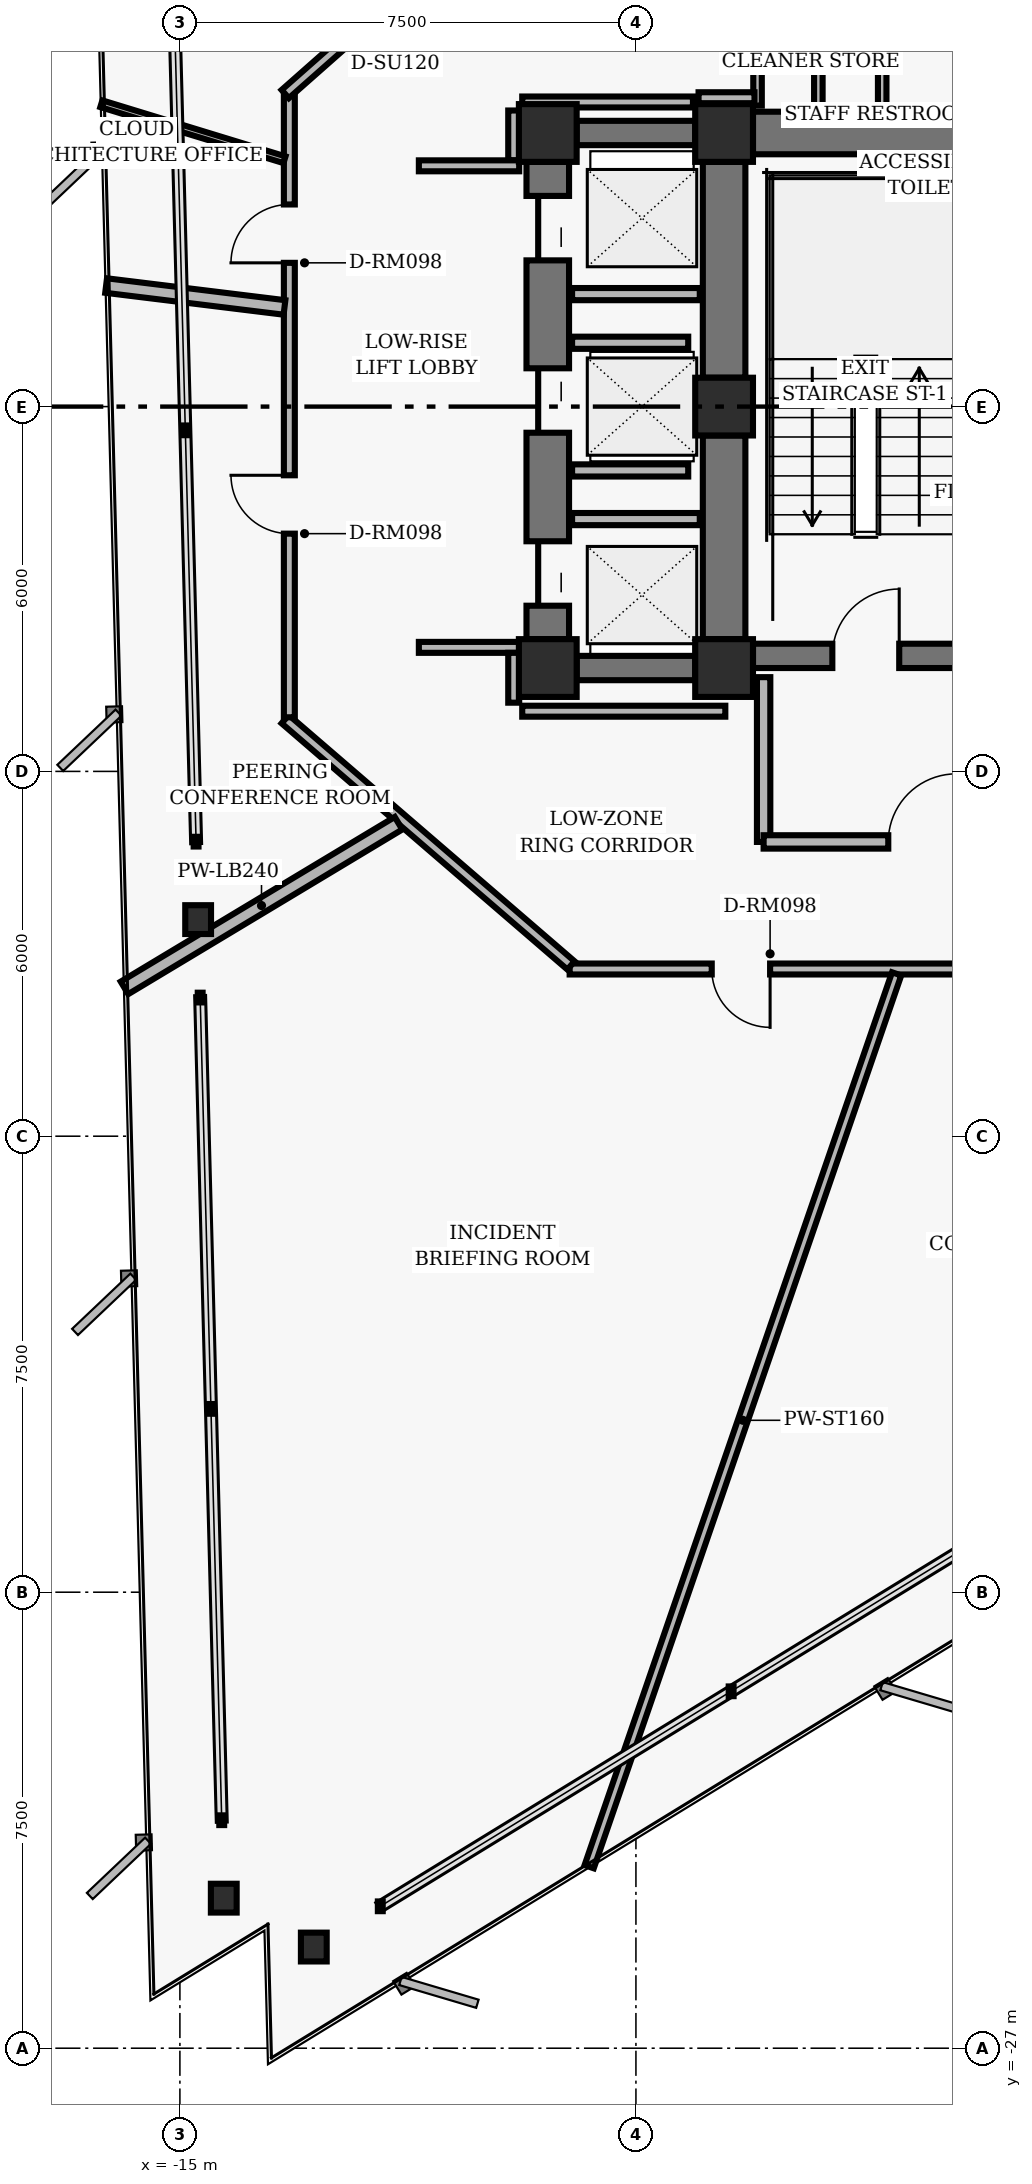
"""IFC4 building model, lengths in metres.
Left out: names, types, materials, properties, quantities, classifications, styles, units other than length and angle.
Written with IfcOpenShell. Run it as: python <this file> out.ifc"""

import sys

from ifc_helpers import new_model, si_unit, direction, frame, frame_2d, origin, origin_2d, place, context, subcontext, project, spatial, rectangle, hollow_rectangle, i_section, extrude, element, fill, save


model = new_model("IFC4")
c1 = context("Model", 3, precision=1e-05, world=origin(), true_north=direction((0.0, 1.0)))
c2 = subcontext(c1, "Body", "Model", "MODEL_VIEW")
j1 = project(units=[si_unit("LENGTHUNIT", "METRE"), si_unit("PLANEANGLEUNIT", "RADIAN")], contexts=[c1])
p1 = place(None, origin())
s1 = spatial("IfcSite", under=j1, at=p1, CompositionType="ELEMENT")
p2 = place(p1, origin())
s2 = spatial("IfcBuilding", under=s1, at=p2, CompositionType="ELEMENT")
p3 = place(p2, frame((0.0, 0.0, 32.32)))
s3 = spatial("IfcBuildingStorey", under=s2, at=p3, CompositionType="ELEMENT", Elevation=32.32)
for number, where, z_axis, x_axis in (
    (1, (-6.05, 4.5, 0.0), (0.0, 0.0, 1.0), (1.0, 0.0, 0.0)),
    (2, (-6.05, 0.0, 0.0), (0.0, 0.0, 1.0), (1.0, 0.0, 0.0)),
    (3, (-6.05, -4.3, 0.0), (0.0, 0.0, 1.0), (1.0, 0.0, 0.0)),
    (4, (-8.95, 4.5, 0.0), (0.0, 0.0, 1.0), (1.0, 0.0, 0.0)),
    (5, (-8.95, -4.3, 0.0), (0.0, 0.0, 1.0), (1.0, 0.0, 0.0)),
):
    element("IfcColumn", number, at=place(p3, frame(where, z_axis=z_axis, x_axis=x_axis)), inside=s3, PredefinedType="COLUMN", context=c2, shape_type="SweptSolid", body=[
        extrude(hollow_rectangle(XDim=0.95, YDim=0.95, WallThickness=0.06, InnerFilletRadius=0.02, OuterFilletRadius=0.04, at=origin_2d()), origin(), (0.0, 0.0, 1.0), 3.36),
    ])
p4 = place(p3, frame((-6.05, 0.475, 0.0), z_axis=(0.0, 0.0, 1.0), x_axis=(0.0, 1.0, 0.0)))
e6 = element("IfcWall", 6, at=p4, inside=s3, PredefinedType="SHEAR", context=c2, shape_type="SweptSolid", body=[
    extrude(rectangle(XDim=3.55, YDim=0.7, at=frame_2d((1.775, 0.0))), origin(), (0.0, 0.0, 1.0), 3.098),
])
p5 = place(p3, frame((-6.05, -3.825, 0.0), z_axis=(0.0, 0.0, 1.0), x_axis=(0.0, 1.0, 0.0)))
e7 = element("IfcWall", 7, at=p5, inside=s3, PredefinedType="SHEAR", context=c2, shape_type="SweptSolid", body=[
    extrude(rectangle(XDim=3.35, YDim=0.7, at=frame_2d((1.675, 0.0))), origin(), (0.0, 0.0, 1.0), 3.098),
])
p6 = place(p3, frame((-5.575, -4.1, 0.0), z_axis=(0.0, 0.0, 1.0), x_axis=(1.0, 0.0, 0.0)))
e8 = element("IfcWall", 8, at=p6, inside=s3, PredefinedType="SHEAR", context=c2, shape_type="SweptSolid", body=[
    extrude(rectangle(XDim=11.15, YDim=0.4, at=frame_2d((5.575, 0.0))), origin(), (0.0, 0.0, 1.0), 3.098),
])
p7 = place(p6, frame((1.305, 0.0, 0.0)))
e9 = element("IfcOpeningElement", 9, at=p7, cuts=e8, PredefinedType="OPENING", context=c2, shape_type="SweptSolid", body=[
    extrude(rectangle(XDim=1.1, YDim=2.04, at=frame_2d((0.55, 1.02))), frame((0.0, 0.21, 0.0), z_axis=(0.0, -1.0, 0.0), x_axis=(1.0, 0.0, 0.0)), (0.0, 0.0, 1.0), 0.42),
])
p8 = place(p6, frame((8.745, 0.0, 0.0)))
e10 = element("IfcOpeningElement", 10, at=p8, cuts=e8, PredefinedType="OPENING", context=c2, shape_type="SweptSolid", body=[
    extrude(rectangle(XDim=1.1, YDim=2.04, at=frame_2d((0.55, 1.02))), frame((0.0, 0.21, 0.0), z_axis=(0.0, -1.0, 0.0), x_axis=(1.0, 0.0, 0.0)), (0.0, 0.0, 1.0), 0.42),
])
p9 = place(p6, frame((4.045, 0.0, 0.0)))
e11 = element("IfcOpeningElement", 11, at=p9, cuts=e8, PredefinedType="OPENING", context=c2, shape_type="SweptSolid", body=[
    extrude(rectangle(XDim=1.06, YDim=2.04, at=frame_2d((0.53, 1.02))), frame((0.0, 0.21, 0.0), z_axis=(0.0, -1.0, 0.0), x_axis=(1.0, 0.0, 0.0)), (0.0, 0.0, 1.0), 0.42),
])
p10 = place(p6, frame((6.045, 0.0, 0.0)))
e12 = element("IfcOpeningElement", 12, at=p10, cuts=e8, PredefinedType="OPENING", context=c2, shape_type="SweptSolid", body=[
    extrude(rectangle(XDim=1.06, YDim=2.04, at=frame_2d((0.53, 1.02))), frame((0.0, 0.21, 0.0), z_axis=(0.0, -1.0, 0.0), x_axis=(1.0, 0.0, 0.0)), (0.0, 0.0, 1.0), 0.42),
])
p11 = place(p3, frame((-5.575, 4.5, 0.0), z_axis=(0.0, 0.0, 1.0), x_axis=(1.0, 0.0, 0.0)))
e13 = element("IfcWall", 13, at=p11, inside=s3, PredefinedType="SHEAR", context=c2, shape_type="SweptSolid", body=[
    extrude(rectangle(XDim=3.525, YDim=0.7, at=frame_2d((1.762, 0.0))), origin(), (0.0, 0.0, 1.0), 3.098),
])
p12 = place(p3, frame((-8.95, -3.825, 0.0), z_axis=(0.0, 0.0, 1.0), x_axis=(0.0, 1.0, 0.0)))
e14 = element("IfcWall", 14, at=p12, inside=s3, PredefinedType="SHEAR", context=c2, shape_type="SweptSolid", body=[
    extrude(rectangle(XDim=7.85, YDim=0.7, at=frame_2d((3.925, 0.0))), origin(), (0.0, 0.0, 1.0), 3.098),
])
p13 = place(p12, frame((0.55, 0.0, 0.0)))
e15 = element("IfcOpeningElement", 15, at=p13, cuts=e14, PredefinedType="OPENING", context=c2, shape_type="SweptSolid", body=[
    extrude(rectangle(XDim=1.06, YDim=2.04, at=frame_2d((0.53, 1.02))), frame((0.0, 0.36, 0.0), z_axis=(0.0, -1.0, 0.0), x_axis=(1.0, 0.0, 0.0)), (0.0, 0.0, 1.0), 0.72),
])
p14 = place(p12, frame((3.395, 0.0, 0.0)))
e16 = element("IfcOpeningElement", 16, at=p14, cuts=e14, PredefinedType="OPENING", context=c2, shape_type="SweptSolid", body=[
    extrude(rectangle(XDim=1.06, YDim=2.04, at=frame_2d((0.53, 1.02))), frame((0.0, 0.36, 0.0), z_axis=(0.0, -1.0, 0.0), x_axis=(1.0, 0.0, 0.0)), (0.0, 0.0, 1.0), 0.72),
])
p15 = place(p12, frame((6.23, 0.0, 0.0)))
e17 = element("IfcOpeningElement", 17, at=p15, cuts=e14, PredefinedType="OPENING", context=c2, shape_type="SweptSolid", body=[
    extrude(rectangle(XDim=1.06, YDim=2.04, at=frame_2d((0.53, 1.02))), frame((0.0, 0.36, 0.0), z_axis=(0.0, -1.0, 0.0), x_axis=(1.0, 0.0, 0.0)), (0.0, 0.0, 1.0), 0.72),
])
for number, where, z_axis, x_axis in (
    (18, (-8.475, 4.5, 0.0), (0.0, 0.0, 1.0), (1.0, 0.0, 0.0)),
    (19, (-8.475, -4.3, 0.0), (0.0, 0.0, 1.0), (1.0, 0.0, 0.0)),
):
    element("IfcWall", number, at=place(p3, frame(where, z_axis=z_axis, x_axis=x_axis)), inside=s3, PredefinedType="SHEAR", context=c2, shape_type="SweptSolid", body=[
        extrude(rectangle(XDim=1.95, YDim=0.4, at=frame_2d((0.975, 0.0))), origin(), (0.0, 0.0, 1.0), 3.098),
    ])
for number, where, z_axis, x_axis in (
    (20, (-14.7, -8.438, 0.0), (0.0, 0.0, 1.0), (1.0, 0.0, 0.0)),
    (21, (-14.279, -24.532, 0.0), (0.0, 0.0, 1.0), (1.0, 0.0, 0.0)),
    (22, (-12.798, -25.336, 0.0), (0.0, 0.0, 1.0), (1.0, 0.0, 0.0)),
):
    element("IfcColumn", number, at=place(p3, frame(where, z_axis=z_axis, x_axis=x_axis)), inside=s3, PredefinedType="COLUMN", context=c2, shape_type="SweptSolid", body=[
        extrude(i_section(OverallWidth=0.424, OverallDepth=0.474, WebThickness=0.048, FlangeThickness=0.077, FilletRadius=0.025, at=origin_2d()), origin(), (0.0, 0.0, 1.0), 3.36),
    ])
p16 = place(p3, frame((-5.4, -7.16, 0.0), z_axis=(0.0, 0.0, 1.0), x_axis=(0.0, 1.0, 0.0)))
e23 = element("IfcWall", 23, at=p16, inside=s3, PredefinedType="PARTITIONING", context=c2, shape_type="SweptSolid", body=[
    extrude(rectangle(XDim=2.71, YDim=0.22, at=frame_2d((1.355, 0.0))), origin(), (0.0, 0.0, 1.0), 3.073),
])
p17 = place(p3, frame((-5.4, -7.16, 0.0), z_axis=(0.0, 0.0, 1.0), x_axis=(1.0, 0.0, 0.0)))
e24 = element("IfcWall", 24, at=p17, inside=s3, PredefinedType="PARTITIONING", context=c2, shape_type="SweptSolid", body=[
    extrude(rectangle(XDim=5.4, YDim=0.22, at=frame_2d((2.7, 0.0))), origin(), (0.0, 0.0, 1.0), 3.073),
])
p18 = place(p17, frame((2.05, 0.0, 0.0)))
e25 = element("IfcOpeningElement", 25, at=p18, cuts=e24, PredefinedType="OPENING", context=c2, shape_type="SweptSolid", body=[
    extrude(rectangle(XDim=1.12, YDim=2.02, at=frame_2d((0.56, 1.01))), frame((0.0, 0.12, 0.0), z_axis=(0.0, -1.0, 0.0), x_axis=(1.0, 0.0, 0.0)), (0.0, 0.0, 1.0), 0.24),
])
for number, where, z_axis, x_axis in (
    (26, (-5.5, 4.95, 0.0), (0.0, 0.0, 1.0), (0.0, 1.0, 0.0)),
    (27, (-4.5, 4.95, 0.0), (0.0, 0.0, 1.0), (0.0, 1.0, 0.0)),
    (28, (-3.45, 4.95, 0.0), (0.0, 0.0, 1.0), (0.0, 1.0, 0.0)),
):
    element("IfcWall", number, at=place(p3, frame(where, z_axis=z_axis, x_axis=x_axis)), inside=s3, PredefinedType="PARTITIONING", context=c2, shape_type="SweptSolid", body=[
        extrude(rectangle(XDim=2.1, YDim=0.14, at=frame_2d((1.05, 0.0))), origin(), (0.0, 0.0, 1.0), 3.073),
    ])
for number, where, z_axis, x_axis in (
    (29, (-8.55, -1.85, 0.0), (0.0, 0.0, 1.0), (1.0, 0.0, 0.0)),
    (30, (-8.55, 1.85, 0.0), (0.0, 0.0, 1.0), (1.0, 0.0, 0.0)),
):
    element("IfcWall", number, at=place(p3, frame(where, z_axis=z_axis, x_axis=x_axis)), inside=s3, PredefinedType="PARTITIONING", context=c2, shape_type="SweptSolid", body=[
        extrude(rectangle(XDim=2.1, YDim=0.2, at=frame_2d((1.05, 0.0))), origin(), (0.0, 0.0, 1.0), 3.073),
    ])
for number, where, z_axis, x_axis in (
    (31, (-8.55, -1.05, 0.0), (0.0, 0.0, 1.0), (1.0, 0.0, 0.0)),
    (32, (-8.55, 1.05, 0.0), (0.0, 0.0, 1.0), (1.0, 0.0, 0.0)),
):
    element("IfcWall", number, at=place(p3, frame(where, z_axis=z_axis, x_axis=x_axis)), inside=s3, PredefinedType="PARTITIONING", context=c2, shape_type="SweptSolid", body=[
        extrude(rectangle(XDim=1.91, YDim=0.2, at=frame_2d((0.955, 0.0))), origin(), (0.0, 0.0, 1.0), 3.073),
    ])
p19 = place(p3, frame((8.41, -9.25, 0.0), z_axis=(0.0, 0.0, 1.0), x_axis=(-1.0, 0.0, 0.0)))
e33 = element("IfcWall", 33, at=p19, inside=s3, PredefinedType="PARTITIONING", context=c2, shape_type="SweptSolid", body=[
    extrude(rectangle(XDim=17.0, YDim=0.18, at=frame_2d((8.5, 0.0))), origin(), (0.0, 0.0, 1.0), 2.587),
])
p20 = place(p19, frame((13.703, 0.0, 0.0)))
e34 = element("IfcOpeningElement", 34, at=p20, cuts=e33, PredefinedType="OPENING", context=c2, shape_type="SweptSolid", body=[
    extrude(rectangle(XDim=0.96, YDim=2.02, at=frame_2d((0.48, 1.01))), frame((0.0, 0.1, 0.0), z_axis=(0.0, -1.0, 0.0), x_axis=(1.0, 0.0, 0.0)), (0.0, 0.0, 1.0), 0.2),
])
p21 = place(p19, frame((7.745, 0.0, 0.0)))
e35 = element("IfcOpeningElement", 35, at=p21, cuts=e33, PredefinedType="OPENING", context=c2, shape_type="SweptSolid", body=[
    extrude(rectangle(XDim=0.96, YDim=2.02, at=frame_2d((0.48, 1.01))), frame((0.0, 0.1, 0.0), z_axis=(0.0, -1.0, 0.0), x_axis=(1.0, 0.0, 0.0)), (0.0, 0.0, 1.0), 0.2),
])
p22 = place(p3, frame((-8.568, -9.191, 0.0), z_axis=(0.0, 0.0, 1.0), x_axis=(-0.757556899173, 0.652769135694, 0.0)))
e36 = element("IfcWall", 36, at=p22, inside=s3, PredefinedType="PARTITIONING", context=c2, shape_type="SweptSolid", body=[
    extrude(rectangle(XDim=6.204, YDim=0.18, at=frame_2d((3.102, 0.0))), origin(), (0.0, 0.0, 1.0), 3.073),
])
p23 = place(p3, frame((-13.2, -5.11, 0.0), z_axis=(0.0, 0.0, 1.0), x_axis=(0.0, 1.0, 0.0)))
e37 = element("IfcWall", 37, at=p23, inside=s3, PredefinedType="PARTITIONING", context=c2, shape_type="SweptSolid", body=[
    extrude(rectangle(XDim=10.22, YDim=0.18, at=frame_2d((5.11, 0.0))), origin(), (0.0, 0.0, 1.0), 2.587),
])
p24 = place(p23, frame((3.02, 0.0, 0.0)))
e38 = element("IfcOpeningElement", 38, at=p24, cuts=e37, PredefinedType="OPENING", context=c2, shape_type="SweptSolid", body=[
    extrude(rectangle(XDim=0.96, YDim=2.02, at=frame_2d((0.48, 1.01))), frame((0.0, 0.1, 0.0), z_axis=(0.0, -1.0, 0.0), x_axis=(1.0, 0.0, 0.0)), (0.0, 0.0, 1.0), 0.2),
])
p25 = place(p23, frame((7.474, 0.0, 0.0)))
e39 = element("IfcOpeningElement", 39, at=p25, cuts=e37, PredefinedType="OPENING", context=c2, shape_type="SweptSolid", body=[
    extrude(rectangle(XDim=0.96, YDim=2.02, at=frame_2d((0.48, 1.01))), frame((0.0, 0.1, 0.0), z_axis=(0.0, -1.0, 0.0), x_axis=(1.0, 0.0, 0.0)), (0.0, 0.0, 1.0), 0.2),
])
p26 = place(p3, frame((-13.268, 5.14, 0.0), z_axis=(0.0, 0.0, 1.0), x_axis=(0.749626463267, 0.66186113768, 0.0)))
e40 = element("IfcWall", 40, at=p26, inside=s3, PredefinedType="PARTITIONING", context=c2, shape_type="SweptSolid", body=[
    extrude(rectangle(XDim=6.27, YDim=0.18, at=frame_2d((3.135, 0.0))), origin(), (0.0, 0.0, 1.0), 3.073),
])
p27 = place(p26, frame((2.193, 0.0, 0.0)))
e41 = element("IfcOpeningElement", 41, at=p27, cuts=e40, PredefinedType="OPENING", context=c2, shape_type="SweptSolid", body=[
    extrude(rectangle(XDim=1.18, YDim=2.02, at=frame_2d((0.59, 1.01))), frame((0.0, 0.1, 0.0), z_axis=(0.0, -1.0, 0.0), x_axis=(1.0, 0.0, 0.0)), (0.0, 0.0, 1.0), 0.2),
])
p28 = place(p3, frame((-9.51, 4.87, 0.0), z_axis=(0.0, 0.0, 1.0), x_axis=(0.0, -1.0, 0.0)))
e42 = element("IfcWall", 42, at=p28, inside=s3, PredefinedType="PARTITIONING", context=c2, shape_type="SweptSolid", body=[
    extrude(rectangle(XDim=0.82, YDim=0.18, at=frame_2d((0.41, 0.0))), origin(), (0.0, 0.0, 1.0), 3.073),
])
for number, where, z_axis, x_axis in (
    (43, (-9.42, 3.96, 0.0), (0.0, 0.0, 1.0), (-1.0, 0.0, 0.0)),
    (44, (-11.07, -3.96, 0.0), (0.0, 0.0, 1.0), (1.0, 0.0, 0.0)),
):
    element("IfcWall", number, at=place(p3, frame(where, z_axis=z_axis, x_axis=x_axis)), inside=s3, PredefinedType="PARTITIONING", context=c2, shape_type="SweptSolid", body=[
        extrude(rectangle(XDim=1.65, YDim=0.18, at=frame_2d((0.825, 0.0))), origin(), (0.0, 0.0, 1.0), 3.073),
    ])
p29 = place(p3, frame((-9.51, -4.05, 0.0), z_axis=(0.0, 0.0, 1.0), x_axis=(0.0, -1.0, 0.0)))
e45 = element("IfcWall", 45, at=p29, inside=s3, PredefinedType="PARTITIONING", context=c2, shape_type="SweptSolid", body=[
    extrude(rectangle(XDim=0.82, YDim=0.18, at=frame_2d((0.41, 0.0))), origin(), (0.0, 0.0, 1.0), 2.358),
])
p30 = place(p3, frame((-9.37, -5.01, 0.0), z_axis=(0.0, 0.0, 1.0), x_axis=(1.0, 0.0, 0.0)))
e46 = element("IfcWall", 46, at=p30, inside=s3, PredefinedType="PARTITIONING", context=c2, shape_type="SweptSolid", body=[
    extrude(rectangle(XDim=3.34, YDim=0.18, at=frame_2d((1.67, 0.0))), origin(), (0.0, 0.0, 1.0), 3.073),
])
p31 = place(p3, frame((-5.55, 5.08, 0.0), z_axis=(0.0, 0.0, 1.0), x_axis=(-1.0, 0.0, 0.0)))
e47 = element("IfcWall", 47, at=p31, inside=s3, PredefinedType="PARTITIONING", context=c2, shape_type="SweptSolid", body=[
    extrude(rectangle(XDim=0.92, YDim=0.18, at=frame_2d((0.46, 0.0))), origin(), (0.0, 0.0, 1.0), 3.073),
])
p32 = place(p3, frame((-6.562, 5.01, 0.0), z_axis=(0.0, 0.0, 1.0), x_axis=(-1.0, 0.0, 0.0)))
e48 = element("IfcWall", 48, at=p32, inside=s3, PredefinedType="PARTITIONING", context=c2, shape_type="SweptSolid", body=[
    extrude(rectangle(XDim=2.808, YDim=0.18, at=frame_2d((1.404, 0.0))), origin(), (0.0, 0.0, 1.0), 3.073),
])
p33 = place(p3, frame((-11.405, -6.853, 0.0), z_axis=(0.0, 0.0, 1.0), x_axis=(-0.857148529273, -0.515069314524, 0.0)))
e49 = element("IfcWall", 49, at=p33, inside=s3, PredefinedType="PARTITIONING", context=c2, shape_type="SweptSolid", body=[
    extrude(rectangle(XDim=5.257, YDim=0.24, at=frame_2d((2.628, 0.0))), origin(), (0.0, 0.0, 1.0), 2.358),
])
p34 = place(p3, frame((-3.213, -9.33, 0.0), z_axis=(0.0, 0.0, 1.0), x_axis=(-0.325559016245, -0.945521722089, 0.0)))
e50 = element("IfcWall", 50, at=p34, inside=s3, PredefinedType="PARTITIONING", context=c2, shape_type="SweptSolid", body=[
    extrude(rectangle(XDim=15.531, YDim=0.16, at=frame_2d((7.766, 0.0))), origin(), (0.0, 0.0, 1.0), 3.073),
])
p35 = place(p3, frame((-13.28, 4.06, 0.0), z_axis=(0.0, 0.0, 1.0), x_axis=(-0.956293781209, 0.292407599118, 0.0)))
e51 = element("IfcWall", 51, at=p35, inside=s3, PredefinedType="MOVABLE", context=c2, shape_type="SweptSolid", body=[
    extrude(rectangle(XDim=3.149, YDim=0.115, at=frame_2d((1.575, 0.0))), origin(), (0.0, 0.0, 1.0), 3.073),
])
p36 = place(p3, frame((-13.28, 1.631, 0.0), z_axis=(0.0, 0.0, 1.0), x_axis=(-0.992548714485, 0.121848468903, 0.0)))
e52 = element("IfcWall", 52, at=p36, inside=s3, PredefinedType="PARTITIONING", context=c2, shape_type="SweptSolid", body=[
    extrude(rectangle(XDim=2.955, YDim=0.24, at=frame_2d((1.478, 0.0))), origin(), (0.0, 0.0, 1.0), 3.073),
])
p37 = place(p7, origin())
e53 = element("IfcDoor", 53, at=p37, inside=s3, OperationType="SINGLE_SWING_RIGHT", PredefinedType="DOOR", context=c2, shape_type="SweptSolid", body=[
    extrude(rectangle(XDim=1.1, YDim=2.04, at=frame_2d((0.55, 1.02))), frame((0.0, 0.025, 0.0), z_axis=(0.0, -1.0, 0.0), x_axis=(1.0, 0.0, 0.0)), (0.0, 0.0, 1.0), 0.05),
])
fill(e9, e53)
p38 = place(p18, origin())
e54 = element("IfcDoor", 54, at=p38, inside=s3, OperationType="SINGLE_SWING_RIGHT", PredefinedType="DOOR", context=c2, shape_type="SweptSolid", body=[
    extrude(rectangle(XDim=1.12, YDim=2.02, at=frame_2d((0.56, 1.01))), frame((0.0, 0.025, 0.0), z_axis=(0.0, -1.0, 0.0), x_axis=(1.0, 0.0, 0.0)), (0.0, 0.0, 1.0), 0.05),
])
fill(e25, e54)
p39 = place(p13, origin())
e55 = element("IfcDoor", 55, at=p39, inside=s3, OperationType="SLIDING_TO_LEFT", PredefinedType="DOOR", context=c2, shape_type="SweptSolid", body=[
    extrude(rectangle(XDim=1.06, YDim=2.04, at=frame_2d((0.53, 1.02))), frame((0.0, 0.025, 0.0), z_axis=(0.0, -1.0, 0.0), x_axis=(1.0, 0.0, 0.0)), (0.0, 0.0, 1.0), 0.05),
])
fill(e15, e55)
p40 = place(p14, origin())
e56 = element("IfcDoor", 56, at=p40, inside=s3, OperationType="SLIDING_TO_RIGHT", PredefinedType="DOOR", context=c2, shape_type="SweptSolid", body=[
    extrude(rectangle(XDim=1.06, YDim=2.04, at=frame_2d((0.53, 1.02))), frame((0.0, 0.025, 0.0), z_axis=(0.0, -1.0, 0.0), x_axis=(1.0, 0.0, 0.0)), (0.0, 0.0, 1.0), 0.05),
])
fill(e16, e56)
p41 = place(p15, origin())
e57 = element("IfcDoor", 57, at=p41, inside=s3, OperationType="SLIDING_TO_LEFT", PredefinedType="DOOR", context=c2, shape_type="SweptSolid", body=[
    extrude(rectangle(XDim=1.06, YDim=2.04, at=frame_2d((0.53, 1.02))), frame((0.0, 0.025, 0.0), z_axis=(0.0, -1.0, 0.0), x_axis=(1.0, 0.0, 0.0)), (0.0, 0.0, 1.0), 0.05),
])
fill(e17, e57)
p42 = place(p24, origin())
e58 = element("IfcDoor", 58, at=p42, inside=s3, OperationType="SINGLE_SWING_RIGHT", PredefinedType="DOOR", context=c2, shape_type="SweptSolid", body=[
    extrude(rectangle(XDim=0.96, YDim=2.02, at=frame_2d((0.48, 1.01))), frame((0.0, 0.025, 0.0), z_axis=(0.0, -1.0, 0.0), x_axis=(1.0, 0.0, 0.0)), (0.0, 0.0, 1.0), 0.05),
])
fill(e38, e58)
p43 = place(p20, origin())
e59 = element("IfcDoor", 59, at=p43, inside=s3, OperationType="SINGLE_SWING_LEFT", PredefinedType="DOOR", context=c2, shape_type="SweptSolid", body=[
    extrude(rectangle(XDim=0.96, YDim=2.02, at=frame_2d((0.48, 1.01))), frame((0.0, 0.025, 0.0), z_axis=(0.0, -1.0, 0.0), x_axis=(1.0, 0.0, 0.0)), (0.0, 0.0, 1.0), 0.05),
])
fill(e34, e59)
p44 = place(p25, origin())
e60 = element("IfcDoor", 60, at=p44, inside=s3, OperationType="SINGLE_SWING_LEFT", PredefinedType="DOOR", context=c2, shape_type="SweptSolid", body=[
    extrude(rectangle(XDim=0.96, YDim=2.02, at=frame_2d((0.48, 1.01))), frame((0.0, 0.025, 0.0), z_axis=(0.0, -1.0, 0.0), x_axis=(1.0, 0.0, 0.0)), (0.0, 0.0, 1.0), 0.05),
])
fill(e39, e60)
save(model, sys.argv[1])
